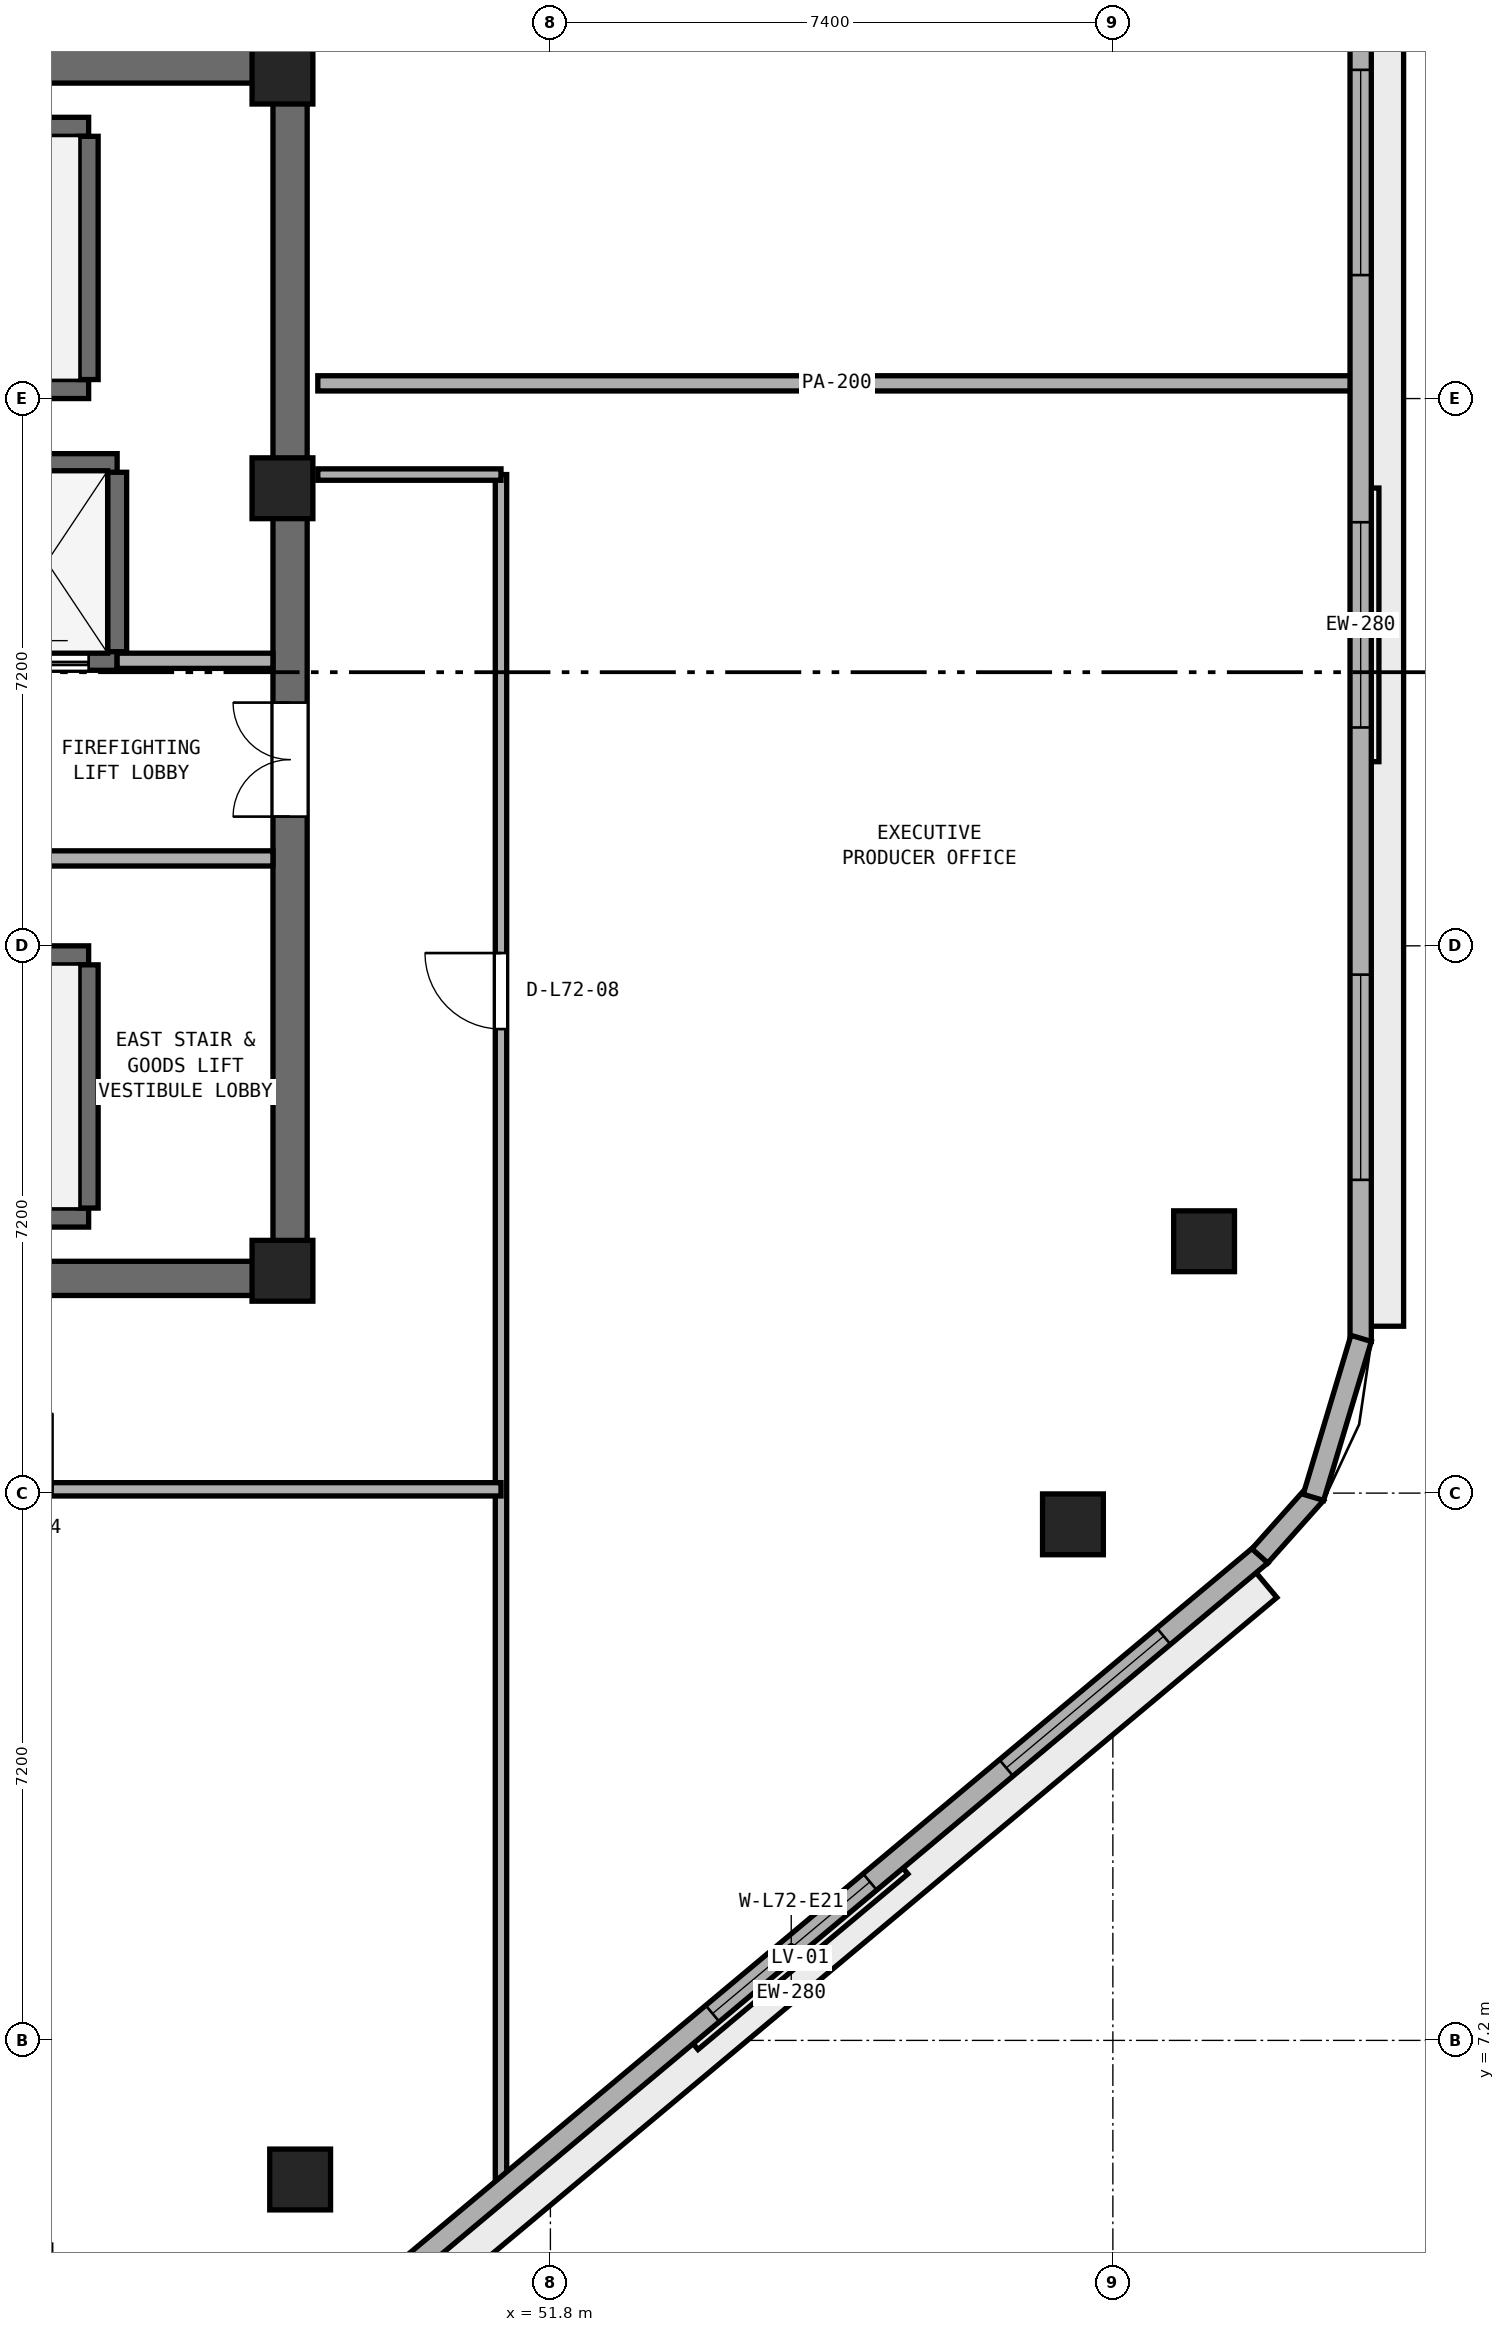
"""IFC4 building model, lengths in metres.
Left out: names, types, materials, properties, quantities, classifications, styles, units other than length and angle.
Written with IfcOpenShell. Run it as: python <this file> out.ifc"""

import sys

from ifc_helpers import new_model, si_unit, direction, frame, frame_2d, origin, origin_2d, place, context, subcontext, project, spatial, rectangle, extrude, element, fill, save


model = new_model("IFC4")
c1 = context("Model", 3, precision=1e-05, world=origin(), true_north=direction((0.0, 1.0)))
c2 = subcontext(c1, "Body", "Model", "MODEL_VIEW")
j1 = project(units=[si_unit("LENGTHUNIT", "METRE"), si_unit("PLANEANGLEUNIT", "RADIAN")], contexts=[c1])
p1 = place(None, origin())
s1 = spatial("IfcSite", under=j1, at=p1, CompositionType="ELEMENT")
p2 = place(p1, origin())
s2 = spatial("IfcBuilding", under=s1, at=p2, CompositionType="ELEMENT")
p3 = place(p2, frame((0.0, 0.0, 282.0)))
s3 = spatial("IfcBuildingStorey", under=s2, at=p3, CompositionType="ELEMENT", Elevation=282.0)
for number, where, z_axis, x_axis in (
    (1, (25.4, 17.225, 0.0), (0.0, 0.0, 1.0), (1.0, 0.0, 0.0)),
    (2, (25.4, 33.175, 0.0), (0.0, 0.0, 1.0), (1.0, 0.0, 0.0)),
):
    element("IfcWall", number, at=place(p3, frame(where, z_axis=z_axis, x_axis=x_axis)), inside=s3, PredefinedType="SHEAR", context=c2, shape_type="SweptSolid", body=[
        extrude(rectangle(XDim=23.2, YDim=0.45, at=frame_2d((11.6, 0.0))), origin(), (0.0, 0.0, 1.0), 3.54),
    ])
p4 = place(p3, frame((48.375, 17.45, 0.0), z_axis=(0.0, 0.0, 1.0), x_axis=(0.0, 1.0, 0.0)))
e3 = element("IfcWall", 3, at=p4, inside=s3, PredefinedType="SHEAR", context=c2, shape_type="SweptSolid", body=[
    extrude(rectangle(XDim=15.5, YDim=0.45, at=frame_2d((7.75, 0.0))), origin(), (0.0, 0.0, 1.0), 3.54),
])
p5 = place(p4, frame((5.85, 0.0, 0.0)))
e4 = element("IfcOpeningElement", 4, at=p5, cuts=e3, PredefinedType="OPENING", context=c2, shape_type="SweptSolid", body=[
    extrude(rectangle(XDim=1.5, YDim=2.15, at=frame_2d((0.75, 1.075))), frame((0.0, 0.235, 0.0), z_axis=(0.0, -1.0, 0.0), x_axis=(1.0, 0.0, 0.0)), (0.0, 0.0, 1.0), 0.47),
])
for number, where, z_axis, x_axis in (
    (5, (48.275, 17.325, 0.0), (0.0, 0.0, 1.0), (1.0, 0.0, 0.0)),
    (6, (48.275, 27.62, 0.0), (0.0, 0.0, 1.0), (1.0, 0.0, 0.0)),
    (7, (48.275, 33.075, 0.0), (0.0, 0.0, 1.0), (1.0, 0.0, 0.0)),
):
    element("IfcColumn", number, at=place(p3, frame(where, z_axis=z_axis, x_axis=x_axis)), inside=s3, PredefinedType="PILASTER", context=c2, shape_type="SweptSolid", body=[
        extrude(rectangle(XDim=0.8, YDim=0.8, at=origin_2d()), origin(), (0.0, 0.0, 1.0), 3.8),
    ])
for number, where, z_axis, x_axis in (
    (8, (48.508, 5.37, 0.0), (0.0, 0.0, 1.0), (1.0, 0.0, 0.0)),
    (9, (58.675, 13.989, 0.0), (0.0, 0.0, 1.0), (1.0, 0.0, 0.0)),
    (10, (60.4, 17.714, 0.0), (0.0, 0.0, 1.0), (1.0, 0.0, 0.0)),
):
    element("IfcColumn", number, at=place(p3, frame(where, z_axis=z_axis, x_axis=x_axis)), inside=s3, PredefinedType="COLUMN", context=c2, shape_type="SweptSolid", body=[
        extrude(rectangle(XDim=0.8, YDim=0.8, at=origin_2d()), origin(), (0.0, 0.0, 1.0), 3.8),
    ])
for number, where, z_axis, x_axis in (
    (11, (38.425, 28.925, 0.0), (0.0, 0.0, 1.0), (1.0, 0.0, 0.0)),
    (12, (38.425, 32.375, 0.0), (0.0, 0.0, 1.0), (1.0, 0.0, 0.0)),
):
    element("IfcWall", number, at=place(p3, frame(where, z_axis=z_axis, x_axis=x_axis)), inside=s3, PredefinedType="SHEAR", context=c2, shape_type="SweptSolid", body=[
        extrude(rectangle(XDim=7.3, YDim=0.25, at=frame_2d((3.65, 0.0))), origin(), (0.0, 0.0, 1.0), 3.54),
    ])
p6 = place(p3, frame((45.725, 29.05, 0.0), z_axis=(0.0, 0.0, 1.0), x_axis=(0.0, 1.0, 0.0)))
e13 = element("IfcWall", 13, at=p6, inside=s3, PredefinedType="SHEAR", context=c2, shape_type="SweptSolid", body=[
    extrude(rectangle(XDim=3.2, YDim=0.25, at=frame_2d((1.6, 0.0))), origin(), (0.0, 0.0, 1.0), 3.54),
])
for number, where, z_axis, x_axis in (
    (14, (38.425, 18.025, 0.0), (0.0, 0.0, 1.0), (1.0, 0.0, 0.0)),
    (15, (38.425, 21.475, 0.0), (0.0, 0.0, 1.0), (1.0, 0.0, 0.0)),
):
    element("IfcWall", number, at=place(p3, frame(where, z_axis=z_axis, x_axis=x_axis)), inside=s3, PredefinedType="SHEAR", context=c2, shape_type="SweptSolid", body=[
        extrude(rectangle(XDim=7.3, YDim=0.25, at=frame_2d((3.65, 0.0))), origin(), (0.0, 0.0, 1.0), 3.54),
    ])
p7 = place(p3, frame((45.725, 18.15, 0.0), z_axis=(0.0, 0.0, 1.0), x_axis=(0.0, 1.0, 0.0)))
e16 = element("IfcWall", 16, at=p7, inside=s3, PredefinedType="SHEAR", context=c2, shape_type="SweptSolid", body=[
    extrude(rectangle(XDim=3.2, YDim=0.25, at=frame_2d((1.6, 0.0))), origin(), (0.0, 0.0, 1.0), 3.54),
])
p8 = place(p3, frame((44.25, 25.35, 0.0), z_axis=(0.0, 0.0, 1.0), x_axis=(1.0, 0.0, 0.0)))
e17 = element("IfcWall", 17, at=p8, inside=s3, PredefinedType="SHEAR", context=c2, shape_type="SweptSolid", body=[
    extrude(rectangle(XDim=1.85, YDim=0.25, at=frame_2d((0.925, 0.0))), origin(), (0.0, 0.0, 1.0), 3.54),
])
p9 = place(p8, frame((0.375, 0.0, 0.0)))
e18 = element("IfcOpeningElement", 18, at=p9, cuts=e17, PredefinedType="OPENING", context=c2, shape_type="SweptSolid", body=[
    extrude(rectangle(XDim=1.1, YDim=2.15, at=frame_2d((0.55, 1.075))), frame((0.0, 0.135, 0.0), z_axis=(0.0, -1.0, 0.0), x_axis=(1.0, 0.0, 0.0)), (0.0, 0.0, 1.0), 0.27),
])
p10 = place(p3, frame((44.25, 27.95, 0.0), z_axis=(0.0, 0.0, 1.0), x_axis=(1.0, 0.0, 0.0)))
e19 = element("IfcWall", 19, at=p10, inside=s3, PredefinedType="SHEAR", context=c2, shape_type="SweptSolid", body=[
    extrude(rectangle(XDim=1.85, YDim=0.25, at=frame_2d((0.925, 0.0))), origin(), (0.0, 0.0, 1.0), 3.54),
])
p11 = place(p3, frame((46.1, 25.47, 0.0), z_axis=(0.0, 0.0, 1.0), x_axis=(0.0, 1.0, 0.0)))
e20 = element("IfcWall", 20, at=p11, inside=s3, PredefinedType="SHEAR", context=c2, shape_type="SweptSolid", body=[
    extrude(rectangle(XDim=2.36, YDim=0.25, at=frame_2d((1.18, 0.0))), origin(), (0.0, 0.0, 1.0), 3.54),
])
p12 = place(p3, frame((42.0, 22.75, 0.0), z_axis=(0.0, 0.0, 1.0), x_axis=(1.0, 0.0, 0.0)))
e21 = element("IfcWall", 21, at=p12, inside=s3, PredefinedType="SOLIDWALL", context=c2, shape_type="SweptSolid", body=[
    extrude(rectangle(XDim=6.15, YDim=0.2, at=frame_2d((3.075, 0.0))), origin(), (0.0, 0.0, 1.0), 3.54),
])
p13 = place(p3, frame((46.1, 25.35, 0.0), z_axis=(0.0, 0.0, 1.0), x_axis=(1.0, 0.0, 0.0)))
e22 = element("IfcWall", 22, at=p13, inside=s3, PredefinedType="SOLIDWALL", context=c2, shape_type="SweptSolid", body=[
    extrude(rectangle(XDim=2.05, YDim=0.2, at=frame_2d((1.025, 0.0))), origin(), (0.0, 0.0, 1.0), 3.54),
])
p14 = place(p3, frame((51.15, 5.182, 0.0), z_axis=(0.0, 0.0, 1.0), x_axis=(0.0, 1.0, 0.0)))
e23 = element("IfcWall", 23, at=p14, inside=s3, PredefinedType="PARTITIONING", context=c2, shape_type="SweptSolid", body=[
    extrude(rectangle(XDim=22.618, YDim=0.15, at=frame_2d((11.309, 0.0))), origin(), (0.0, 0.0, 1.0), 3.54),
])
p15 = place(p14, frame((15.323, 0.0, 0.0)))
e24 = element("IfcOpeningElement", 24, at=p15, cuts=e23, PredefinedType="OPENING", context=c2, shape_type="SweptSolid", body=[
    extrude(rectangle(XDim=1.0, YDim=2.12, at=frame_2d((0.5, 1.06))), frame((0.0, 0.085, 0.0), z_axis=(0.0, -1.0, 0.0), x_axis=(1.0, 0.0, 0.0)), (0.0, 0.0, 1.0), 0.17),
])
p16 = place(p3, frame((38.35, 14.45, 0.0), z_axis=(0.0, 0.0, 1.0), x_axis=(1.0, 0.0, 0.0)))
e25 = element("IfcWall", 25, at=p16, inside=s3, PredefinedType="PARTITIONING", context=c2, shape_type="SweptSolid", body=[
    extrude(rectangle(XDim=12.8, YDim=0.175, at=frame_2d((6.4, 0.0))), origin(), (0.0, 0.0, 1.0), 3.54),
])
p17 = place(p16, frame((5.9, 0.0, 0.0)))
e26 = element("IfcOpeningElement", 26, at=p17, cuts=e25, PredefinedType="OPENING", context=c2, shape_type="SweptSolid", body=[
    extrude(rectangle(XDim=1.0, YDim=2.12, at=frame_2d((0.5, 1.06))), frame((0.0, 0.097, 0.0), z_axis=(0.0, -1.0, 0.0), x_axis=(1.0, 0.0, 0.0)), (0.0, 0.0, 1.0), 0.195),
])
p18 = place(p3, frame((48.74, 27.8, 0.0), z_axis=(0.0, 0.0, 1.0), x_axis=(1.0, 0.0, 0.0)))
e27 = element("IfcWall", 27, at=p18, inside=s3, PredefinedType="PARTITIONING", context=c2, shape_type="SweptSolid", body=[
    extrude(rectangle(XDim=2.41, YDim=0.15, at=frame_2d((1.205, 0.0))), origin(), (0.0, 0.0, 1.0), 3.54),
])
p19 = place(p3, frame((48.74, 29.0, 0.0), z_axis=(0.0, 0.0, 1.0), x_axis=(1.0, 0.0, 0.0)))
e28 = element("IfcWall", 28, at=p19, inside=s3, PredefinedType="PARTITIONING", context=c2, shape_type="SweptSolid", body=[
    extrude(rectangle(XDim=13.655, YDim=0.2, at=frame_2d((6.828, 0.0))), origin(), (0.0, 0.0, 1.0), 3.54),
])
p20 = place(p3, frame((48.789, 3.25, 0.0), z_axis=(0.0, 0.0, 1.0), x_axis=(0.767032672101, 0.641608042288, 0.0)))
e29 = element("IfcWall", 29, at=p20, inside=s3, PredefinedType="STANDARD", context=c2, shape_type="SweptSolid", body=[
    extrude(rectangle(XDim=16.113, YDim=0.28, at=frame_2d((8.057, 0.0))), origin(), (0.0, 0.0, 1.0), 3.54),
])
p21 = place(p20, frame((6.707, 0.0, 0.9)))
e30 = element("IfcOpeningElement", 30, at=p21, cuts=e29, PredefinedType="OPENING", context=c2, shape_type="SweptSolid", body=[
    extrude(rectangle(XDim=2.7, YDim=1.75, at=frame_2d((1.35, 0.875))), frame((0.0, 0.15, 0.0), z_axis=(0.0, -1.0, 0.0), x_axis=(1.0, 0.0, 0.0)), (0.0, 0.0, 1.0), 0.3),
])
p22 = place(p20, frame((11.744, 0.0, 0.9)))
e31 = element("IfcOpeningElement", 31, at=p22, cuts=e29, PredefinedType="OPENING", context=c2, shape_type="SweptSolid", body=[
    extrude(rectangle(XDim=2.7, YDim=1.75, at=frame_2d((1.35, 0.875))), frame((0.0, 0.15, 0.0), z_axis=(0.0, -1.0, 0.0), x_axis=(1.0, 0.0, 0.0)), (0.0, 0.0, 1.0), 0.3),
])
p23 = place(p3, frame((62.46, 16.396, 0.0), z_axis=(0.0, 0.0, 1.0), x_axis=(0.0, 1.0, 0.0)))
e32 = element("IfcWall", 32, at=p23, inside=s3, PredefinedType="STANDARD", context=c2, shape_type="SweptSolid", body=[
    extrude(rectangle(XDim=18.854, YDim=0.28, at=frame_2d((9.427, 0.0))), origin(), (0.0, 0.0, 1.0), 3.54),
])
p24 = place(p23, frame((2.126, 0.0, 0.9)))
e33 = element("IfcOpeningElement", 33, at=p24, cuts=e32, PredefinedType="OPENING", context=c2, shape_type="SweptSolid", body=[
    extrude(rectangle(XDim=2.7, YDim=1.75, at=frame_2d((1.35, 0.875))), frame((0.0, 0.15, 0.0), z_axis=(0.0, -1.0, 0.0), x_axis=(1.0, 0.0, 0.0)), (0.0, 0.0, 1.0), 0.3),
])
p25 = place(p23, frame((8.077, 0.0, 0.9)))
e34 = element("IfcOpeningElement", 34, at=p25, cuts=e32, PredefinedType="OPENING", context=c2, shape_type="SweptSolid", body=[
    extrude(rectangle(XDim=2.7, YDim=1.75, at=frame_2d((1.35, 0.875))), frame((0.0, 0.15, 0.0), z_axis=(0.0, -1.0, 0.0), x_axis=(1.0, 0.0, 0.0)), (0.0, 0.0, 1.0), 0.3),
])
p26 = place(p23, frame((14.029, 0.0, 0.9)))
e35 = element("IfcOpeningElement", 35, at=p26, cuts=e32, PredefinedType="OPENING", context=c2, shape_type="SweptSolid", body=[
    extrude(rectangle(XDim=2.7, YDim=1.75, at=frame_2d((1.35, 0.875))), frame((0.0, 0.15, 0.0), z_axis=(0.0, -1.0, 0.0), x_axis=(1.0, 0.0, 0.0)), (0.0, 0.0, 1.0), 0.3),
])
p27 = place(p3, frame((61.134, 13.574, 0.0), z_axis=(0.0, 0.0, 1.0), x_axis=(0.665804679247, 0.74612608123, 0.0)))
e36 = element("IfcWall", 36, at=p27, inside=s3, PredefinedType="STANDARD", context=c2, shape_type="SweptSolid", body=[
    extrude(rectangle(XDim=1.103, YDim=0.28, at=frame_2d((0.552, 0.0))), origin(), (0.0, 0.0, 1.0), 3.54),
])
p28 = place(p3, frame((61.839, 14.344, 0.0), z_axis=(0.0, 0.0, 1.0), x_axis=(0.287235049694, 0.957860128739, 0.0)))
e37 = element("IfcWall", 37, at=p28, inside=s3, PredefinedType="STANDARD", context=c2, shape_type="SweptSolid", body=[
    extrude(rectangle(XDim=2.184, YDim=0.28, at=frame_2d((1.092, 0.0))), origin(), (0.0, 0.0, 1.0), 3.54),
])
p29 = place(p9, origin())
e38 = element("IfcDoor", 38, at=p29, inside=s3, OperationType="DOUBLE_DOOR_SLIDING", PredefinedType="DOOR", context=c2, shape_type="SweptSolid", body=[
    extrude(rectangle(XDim=1.1, YDim=2.15, at=frame_2d((0.55, 1.075))), frame((0.0, 0.025, 0.0), z_axis=(0.0, -1.0, 0.0), x_axis=(1.0, 0.0, 0.0)), (0.0, 0.0, 1.0), 0.05),
])
fill(e18, e38)
p30 = place(p5, origin())
e39 = element("IfcDoor", 39, at=p30, inside=s3, OperationType="DOUBLE_DOOR_SINGLE_SWING", PredefinedType="DOOR", context=c2, shape_type="SweptSolid", body=[
    extrude(rectangle(XDim=1.5, YDim=2.15, at=frame_2d((0.75, 1.075))), frame((0.0, 0.025, 0.0), z_axis=(0.0, -1.0, 0.0), x_axis=(1.0, 0.0, 0.0)), (0.0, 0.0, 1.0), 0.05),
])
fill(e4, e39)
p31 = place(p15, origin())
e40 = element("IfcDoor", 40, at=p31, inside=s3, OperationType="SINGLE_SWING_RIGHT", PredefinedType="DOOR", context=c2, shape_type="SweptSolid", body=[
    extrude(rectangle(XDim=1.0, YDim=2.12, at=frame_2d((0.5, 1.06))), frame((0.0, 0.025, 0.0), z_axis=(0.0, -1.0, 0.0), x_axis=(1.0, 0.0, 0.0)), (0.0, 0.0, 1.0), 0.05),
])
fill(e24, e40)
p32 = place(p21, origin())
e41 = element("IfcWindow", 41, at=p32, inside=s3, PartitioningType="SINGLE_PANEL", PredefinedType="WINDOW", context=c2, shape_type="SweptSolid", body=[
    extrude(rectangle(XDim=2.7, YDim=1.75, at=frame_2d((1.35, 0.875))), frame((0.0, 0.03, 0.0), z_axis=(0.0, -1.0, 0.0), x_axis=(1.0, 0.0, 0.0)), (0.0, 0.0, 1.0), 0.06),
])
fill(e30, e41)
p33 = place(p22, origin())
e42 = element("IfcWindow", 42, at=p33, inside=s3, PartitioningType="SINGLE_PANEL", PredefinedType="WINDOW", context=c2, shape_type="SweptSolid", body=[
    extrude(rectangle(XDim=2.7, YDim=1.75, at=frame_2d((1.35, 0.875))), frame((0.0, 0.03, 0.0), z_axis=(0.0, -1.0, 0.0), x_axis=(1.0, 0.0, 0.0)), (0.0, 0.0, 1.0), 0.06),
])
fill(e31, e42)
p34 = place(p24, origin())
e43 = element("IfcWindow", 43, at=p34, inside=s3, PartitioningType="SINGLE_PANEL", PredefinedType="WINDOW", context=c2, shape_type="SweptSolid", body=[
    extrude(rectangle(XDim=2.7, YDim=1.75, at=frame_2d((1.35, 0.875))), frame((0.0, 0.03, 0.0), z_axis=(0.0, -1.0, 0.0), x_axis=(1.0, 0.0, 0.0)), (0.0, 0.0, 1.0), 0.06),
])
fill(e33, e43)
p35 = place(p25, origin())
e44 = element("IfcWindow", 44, at=p35, inside=s3, PartitioningType="SINGLE_PANEL", PredefinedType="WINDOW", context=c2, shape_type="SweptSolid", body=[
    extrude(rectangle(XDim=2.7, YDim=1.75, at=frame_2d((1.35, 0.875))), frame((0.0, 0.03, 0.0), z_axis=(0.0, -1.0, 0.0), x_axis=(1.0, 0.0, 0.0)), (0.0, 0.0, 1.0), 0.06),
])
fill(e34, e44)
p36 = place(p26, origin())
e45 = element("IfcWindow", 45, at=p36, inside=s3, PartitioningType="SINGLE_PANEL", PredefinedType="WINDOW", context=c2, shape_type="SweptSolid", body=[
    extrude(rectangle(XDim=2.7, YDim=1.75, at=frame_2d((1.35, 0.875))), frame((0.0, 0.03, 0.0), z_axis=(0.0, -1.0, 0.0), x_axis=(1.0, 0.0, 0.0)), (0.0, 0.0, 1.0), 0.06),
])
fill(e35, e45)
save(model, sys.argv[1])
